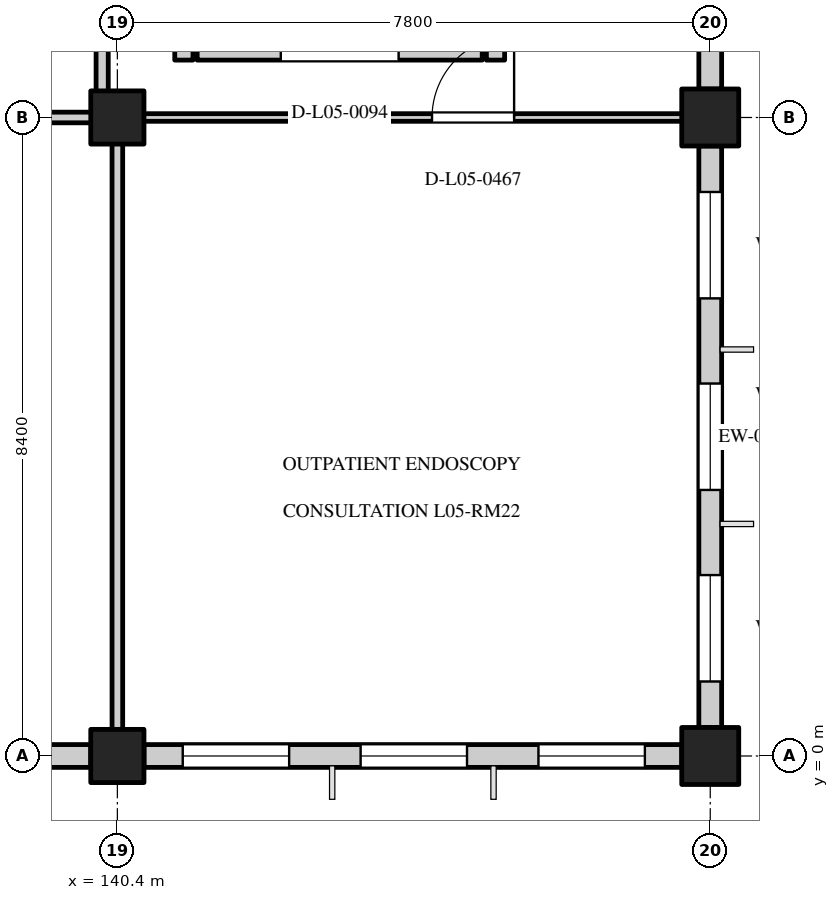
"""IFC4 building model, lengths in metres.
Left out: names, types, materials, properties, quantities, classifications, styles, units other than length and angle.
Written with IfcOpenShell. Run it as: python <this file> out.ifc"""

import sys

from ifc_helpers import new_model, si_unit, direction, frame, frame_2d, origin, origin_2d, place, context, subcontext, project, spatial, rectangle, extrude, element, fill, save


model = new_model("IFC4")
c1 = context("Model", 3, precision=1e-05, world=origin(), true_north=direction((0.0, 1.0)))
c2 = subcontext(c1, "Body", "Model", "MODEL_VIEW")
j1 = project(units=[si_unit("LENGTHUNIT", "METRE"), si_unit("PLANEANGLEUNIT", "RADIAN")], contexts=[c1])
p1 = place(None, origin())
s1 = spatial("IfcSite", under=j1, at=p1, CompositionType="ELEMENT")
p2 = place(p1, origin())
s2 = spatial("IfcBuilding", under=s1, at=p2, CompositionType="ELEMENT")
p3 = place(p2, frame((0.0, 0.0, 22.2)))
s3 = spatial("IfcBuildingStorey", under=s2, at=p3, CompositionType="ELEMENT", Elevation=22.2)
for number, where, z_axis, x_axis in (
    (1, (140.4, 0.0, 0.0), (0.0, 0.0, 1.0), (1.0, 0.0, 0.0)),
    (2, (140.4, 8.4, 0.0), (0.0, 0.0, 1.0), (1.0, 0.0, 0.0)),
):
    element("IfcColumn", number, at=place(p3, frame(where, z_axis=z_axis, x_axis=x_axis)), inside=s3, PredefinedType="COLUMN", context=c2, shape_type="SweptSolid", body=[
        extrude(rectangle(XDim=0.7, YDim=0.7, at=origin_2d()), origin(), (0.0, 0.0, 1.0), 3.9),
    ])
for number, where, z_axis, x_axis in (
    (3, (148.2, 0.0, 0.0), (0.0, 0.0, 1.0), (1.0, 0.0, 0.0)),
    (4, (148.2, 8.4, 0.0), (0.0, 0.0, 1.0), (1.0, 0.0, 0.0)),
):
    element("IfcColumn", number, at=place(p3, frame(where, z_axis=z_axis, x_axis=x_axis)), inside=s3, PredefinedType="COLUMN", context=c2, shape_type="SweptSolid", body=[
        extrude(rectangle(XDim=0.75, YDim=0.75, at=origin_2d()), origin(), (0.0, 0.0, 1.0), 3.9),
    ])
p4 = place(p3, frame((132.95, 0.0, 0.0), z_axis=(0.0, 0.0, 1.0), x_axis=(1.0, 0.0, 0.0)))
e5 = element("IfcWall", 5, at=p4, inside=s3, PredefinedType="STANDARD", context=c2, shape_type="SweptSolid", body=[
    extrude(rectangle(XDim=7.1, YDim=0.3, at=frame_2d((3.55, 0.0))), origin(), (0.0, 0.0, 1.0), 3.05),
])
p5 = place(p4, frame((0.61, 0.0, 0.8)))
e6 = element("IfcOpeningElement", 6, at=p5, cuts=e5, PredefinedType="OPENING", context=c2, shape_type="SweptSolid", body=[
    extrude(rectangle(XDim=1.2, YDim=1.4, at=frame_2d((0.6, 0.7))), frame((0.0, 0.162, 0.0), z_axis=(0.0, -1.0, 0.0), x_axis=(1.0, 0.0, 0.0)), (0.0, 0.0, 1.0), 0.324),
])
p6 = place(p4, frame((2.95, 0.0, 0.8)))
e7 = element("IfcOpeningElement", 7, at=p6, cuts=e5, PredefinedType="OPENING", context=c2, shape_type="SweptSolid", body=[
    extrude(rectangle(XDim=1.2, YDim=1.4, at=frame_2d((0.6, 0.7))), frame((0.0, 0.162, 0.0), z_axis=(0.0, -1.0, 0.0), x_axis=(1.0, 0.0, 0.0)), (0.0, 0.0, 1.0), 0.324),
])
p7 = place(p4, frame((5.29, 0.0, 0.8)))
e8 = element("IfcOpeningElement", 8, at=p7, cuts=e5, PredefinedType="OPENING", context=c2, shape_type="SweptSolid", body=[
    extrude(rectangle(XDim=1.2, YDim=1.4, at=frame_2d((0.6, 0.7))), frame((0.0, 0.162, 0.0), z_axis=(0.0, -1.0, 0.0), x_axis=(1.0, 0.0, 0.0)), (0.0, 0.0, 1.0), 0.324),
])
p8 = place(p3, frame((140.75, 0.0, 0.0), z_axis=(0.0, 0.0, 1.0), x_axis=(1.0, 0.0, 0.0)))
e9 = element("IfcWall", 9, at=p8, inside=s3, PredefinedType="STANDARD", context=c2, shape_type="SweptSolid", body=[
    extrude(rectangle(XDim=7.075, YDim=0.3, at=frame_2d((3.538, 0.0))), origin(), (0.0, 0.0, 1.0), 3.05),
])
p9 = place(p8, frame((0.51, 0.0, 0.8)))
e10 = element("IfcOpeningElement", 10, at=p9, cuts=e9, PredefinedType="OPENING", context=c2, shape_type="SweptSolid", body=[
    extrude(rectangle(XDim=1.4, YDim=1.6, at=frame_2d((0.7, 0.8))), frame((0.0, 0.162, 0.0), z_axis=(0.0, -1.0, 0.0), x_axis=(1.0, 0.0, 0.0)), (0.0, 0.0, 1.0), 0.324),
])
p10 = place(p8, frame((2.85, 0.0, 0.8)))
e11 = element("IfcOpeningElement", 11, at=p10, cuts=e9, PredefinedType="OPENING", context=c2, shape_type="SweptSolid", body=[
    extrude(rectangle(XDim=1.4, YDim=1.6, at=frame_2d((0.7, 0.8))), frame((0.0, 0.162, 0.0), z_axis=(0.0, -1.0, 0.0), x_axis=(1.0, 0.0, 0.0)), (0.0, 0.0, 1.0), 0.324),
])
p11 = place(p8, frame((5.19, 0.0, 0.8)))
e12 = element("IfcOpeningElement", 12, at=p11, cuts=e9, PredefinedType="OPENING", context=c2, shape_type="SweptSolid", body=[
    extrude(rectangle(XDim=1.4, YDim=1.6, at=frame_2d((0.7, 0.8))), frame((0.0, 0.162, 0.0), z_axis=(0.0, -1.0, 0.0), x_axis=(1.0, 0.0, 0.0)), (0.0, 0.0, 1.0), 0.324),
])
p12 = place(p3, frame((148.2, 0.375, 0.0), z_axis=(0.0, 0.0, 1.0), x_axis=(0.0, 1.0, 0.0)))
e13 = element("IfcWall", 13, at=p12, inside=s3, PredefinedType="STANDARD", context=c2, shape_type="SweptSolid", body=[
    extrude(rectangle(XDim=7.65, YDim=0.3, at=frame_2d((3.825, 0.0))), origin(), (0.0, 0.0, 1.0), 2.95),
])
p13 = place(p12, frame((0.605, 0.0, 0.8)))
e14 = element("IfcOpeningElement", 14, at=p13, cuts=e13, PredefinedType="OPENING", context=c2, shape_type="SweptSolid", body=[
    extrude(rectangle(XDim=1.4, YDim=1.45, at=frame_2d((0.7, 0.725))), frame((0.0, 0.162, 0.0), z_axis=(0.0, -1.0, 0.0), x_axis=(1.0, 0.0, 0.0)), (0.0, 0.0, 1.0), 0.324),
])
p14 = place(p12, frame((3.125, 0.0, 0.8)))
e15 = element("IfcOpeningElement", 15, at=p14, cuts=e13, PredefinedType="OPENING", context=c2, shape_type="SweptSolid", body=[
    extrude(rectangle(XDim=1.4, YDim=1.45, at=frame_2d((0.7, 0.725))), frame((0.0, 0.162, 0.0), z_axis=(0.0, -1.0, 0.0), x_axis=(1.0, 0.0, 0.0)), (0.0, 0.0, 1.0), 0.324),
])
p15 = place(p12, frame((5.645, 0.0, 0.8)))
e16 = element("IfcOpeningElement", 16, at=p15, cuts=e13, PredefinedType="OPENING", context=c2, shape_type="SweptSolid", body=[
    extrude(rectangle(XDim=1.4, YDim=1.45, at=frame_2d((0.7, 0.725))), frame((0.0, 0.162, 0.0), z_axis=(0.0, -1.0, 0.0), x_axis=(1.0, 0.0, 0.0)), (0.0, 0.0, 1.0), 0.324),
])
p16 = place(p3, frame((148.2, 8.775, 0.0), z_axis=(0.0, 0.0, 1.0), x_axis=(0.0, 1.0, 0.0)))
e17 = element("IfcWall", 17, at=p16, inside=s3, PredefinedType="STANDARD", context=c2, shape_type="SweptSolid", body=[
    extrude(rectangle(XDim=7.65, YDim=0.3, at=frame_2d((3.825, 0.0))), origin(), (0.0, 0.0, 1.0), 2.95),
])
p17 = place(p16, frame((0.705, 0.0, 0.8)))
e18 = element("IfcOpeningElement", 18, at=p17, cuts=e17, PredefinedType="OPENING", context=c2, shape_type="SweptSolid", body=[
    extrude(rectangle(XDim=1.2, YDim=1.55, at=frame_2d((0.6, 0.775))), frame((0.0, 0.162, 0.0), z_axis=(0.0, -1.0, 0.0), x_axis=(1.0, 0.0, 0.0)), (0.0, 0.0, 1.0), 0.324),
])
p18 = place(p16, frame((3.225, 0.0, 0.8)))
e19 = element("IfcOpeningElement", 19, at=p18, cuts=e17, PredefinedType="OPENING", context=c2, shape_type="SweptSolid", body=[
    extrude(rectangle(XDim=1.2, YDim=1.55, at=frame_2d((0.6, 0.775))), frame((0.0, 0.162, 0.0), z_axis=(0.0, -1.0, 0.0), x_axis=(1.0, 0.0, 0.0)), (0.0, 0.0, 1.0), 0.324),
])
p19 = place(p16, frame((5.745, 0.0, 0.8)))
e20 = element("IfcOpeningElement", 20, at=p19, cuts=e17, PredefinedType="OPENING", context=c2, shape_type="SweptSolid", body=[
    extrude(rectangle(XDim=1.2, YDim=1.55, at=frame_2d((0.6, 0.775))), frame((0.0, 0.162, 0.0), z_axis=(0.0, -1.0, 0.0), x_axis=(1.0, 0.0, 0.0)), (0.0, 0.0, 1.0), 0.324),
])
for number, where, z_axis, x_axis in (
    (21, (141.275, 9.155, 0.0), (0.0, 0.0, 1.0), (0.0, 1.0, 0.0)),
    (22, (145.375, 9.155, 0.0), (0.0, 0.0, 1.0), (0.0, 1.0, 0.0)),
):
    element("IfcWall", number, at=place(p3, frame(where, z_axis=z_axis, x_axis=x_axis)), inside=s3, PredefinedType="STANDARD", context=c2, shape_type="SweptSolid", body=[
        extrude(rectangle(XDim=2.695, YDim=0.24, at=frame_2d((1.348, 0.0))), origin(), (0.0, 0.0, 1.0), 3.6),
    ])
p20 = place(p3, frame((141.45, 9.275, 0.0), z_axis=(0.0, 0.0, 1.0), x_axis=(1.0, 0.0, 0.0)))
e23 = element("IfcWall", 23, at=p20, inside=s3, PredefinedType="STANDARD", context=c2, shape_type="SweptSolid", body=[
    extrude(rectangle(XDim=3.75, YDim=0.24, at=frame_2d((1.875, 0.0))), origin(), (0.0, 0.0, 1.0), 3.6),
])
p21 = place(p20, frame((1.1, 0.0, 0.0)))
e24 = element("IfcOpeningElement", 24, at=p21, cuts=e23, PredefinedType="OPENING", context=c2, shape_type="SweptSolid", body=[
    extrude(rectangle(XDim=1.55, YDim=2.25, at=frame_2d((0.775, 1.125))), frame((0.0, 0.132, 0.0), z_axis=(0.0, -1.0, 0.0), x_axis=(1.0, 0.0, 0.0)), (0.0, 0.0, 1.0), 0.264),
])
p22 = place(p3, frame((132.29, 8.4, 0.0), z_axis=(0.0, 0.0, 1.0), x_axis=(1.0, 0.0, 0.0)))
e25 = element("IfcWall", 25, at=p22, inside=s3, PredefinedType="PARTITIONING", context=c2, shape_type="SweptSolid", body=[
    extrude(rectangle(XDim=8.025, YDim=0.14, at=frame_2d((4.012, 0.0))), origin(), (0.0, 0.0, 1.0), 3.58),
])
p23 = place(p22, frame((2.341, 0.0, 0.0)))
e26 = element("IfcOpeningElement", 26, at=p23, cuts=e25, PredefinedType="OPENING", context=c2, shape_type="SweptSolid", body=[
    extrude(rectangle(XDim=1.95, YDim=2.35, at=frame_2d((0.975, 1.175))), frame((0.0, 0.082, 0.0), z_axis=(0.0, -1.0, 0.0), x_axis=(1.0, 0.0, 0.0)), (0.0, 0.0, 1.0), 0.164),
])
p24 = place(p3, frame((140.4, 0.085, 0.0), z_axis=(0.0, 0.0, 1.0), x_axis=(0.0, 1.0, 0.0)))
e27 = element("IfcWall", 27, at=p24, inside=s3, PredefinedType="PARTITIONING", context=c2, shape_type="SweptSolid", body=[
    extrude(rectangle(XDim=8.23, YDim=0.14, at=frame_2d((4.115, 0.0))), origin(), (0.0, 0.0, 1.0), 3.58),
])
p25 = place(p3, frame((140.2, 8.485, 0.0), z_axis=(0.0, 0.0, 1.0), x_axis=(0.0, 1.0, 0.0)))
e28 = element("IfcWall", 28, at=p25, inside=s3, PredefinedType="PARTITIONING", context=c2, shape_type="SweptSolid", body=[
    extrude(rectangle(XDim=16.63, YDim=0.16, at=frame_2d((8.315, 0.0))), origin(), (0.0, 0.0, 1.0), 3.58),
])
p26 = place(p3, frame((140.485, 8.4, 0.0), z_axis=(0.0, 0.0, 1.0), x_axis=(1.0, 0.0, 0.0)))
e29 = element("IfcWall", 29, at=p26, inside=s3, PredefinedType="PARTITIONING", context=c2, shape_type="SweptSolid", body=[
    extrude(rectangle(XDim=7.43, YDim=0.1, at=frame_2d((3.715, 0.0))), origin(), (0.0, 0.0, 1.0), 3.58),
])
p27 = place(p26, frame((4.055, 0.0, 0.0)))
e30 = element("IfcOpeningElement", 30, at=p27, cuts=e29, PredefinedType="OPENING", context=c2, shape_type="SweptSolid", body=[
    extrude(rectangle(XDim=1.08, YDim=2.15, at=frame_2d((0.54, 1.075))), frame((0.0, 0.062, 0.0), z_axis=(0.0, -1.0, 0.0), x_axis=(1.0, 0.0, 0.0)), (0.0, 0.0, 1.0), 0.124),
])
p28 = place(p9, origin())
e31 = element("IfcWindow", 31, at=p28, inside=s3, PartitioningType="SINGLE_PANEL", PredefinedType="WINDOW", context=c2, shape_type="SweptSolid", body=[
    extrude(rectangle(XDim=1.4, YDim=1.6, at=frame_2d((0.7, 0.8))), frame((0.0, 0.03, 0.0), z_axis=(0.0, -1.0, 0.0), x_axis=(1.0, 0.0, 0.0)), (0.0, 0.0, 1.0), 0.06),
])
fill(e10, e31)
p29 = place(p10, origin())
e32 = element("IfcWindow", 32, at=p29, inside=s3, PartitioningType="SINGLE_PANEL", PredefinedType="WINDOW", context=c2, shape_type="SweptSolid", body=[
    extrude(rectangle(XDim=1.4, YDim=1.6, at=frame_2d((0.7, 0.8))), frame((0.0, 0.03, 0.0), z_axis=(0.0, -1.0, 0.0), x_axis=(1.0, 0.0, 0.0)), (0.0, 0.0, 1.0), 0.06),
])
fill(e11, e32)
p30 = place(p11, origin())
e33 = element("IfcWindow", 33, at=p30, inside=s3, PartitioningType="SINGLE_PANEL", PredefinedType="WINDOW", context=c2, shape_type="SweptSolid", body=[
    extrude(rectangle(XDim=1.4, YDim=1.6, at=frame_2d((0.7, 0.8))), frame((0.0, 0.03, 0.0), z_axis=(0.0, -1.0, 0.0), x_axis=(1.0, 0.0, 0.0)), (0.0, 0.0, 1.0), 0.06),
])
fill(e12, e33)
p31 = place(p13, origin())
e34 = element("IfcWindow", 34, at=p31, inside=s3, PartitioningType="SINGLE_PANEL", PredefinedType="WINDOW", context=c2, shape_type="SweptSolid", body=[
    extrude(rectangle(XDim=1.4, YDim=1.45, at=frame_2d((0.7, 0.725))), frame((0.0, 0.03, 0.0), z_axis=(0.0, -1.0, 0.0), x_axis=(1.0, 0.0, 0.0)), (0.0, 0.0, 1.0), 0.06),
])
fill(e14, e34)
p32 = place(p14, origin())
e35 = element("IfcWindow", 35, at=p32, inside=s3, PartitioningType="SINGLE_PANEL", PredefinedType="WINDOW", context=c2, shape_type="SweptSolid", body=[
    extrude(rectangle(XDim=1.4, YDim=1.45, at=frame_2d((0.7, 0.725))), frame((0.0, 0.03, 0.0), z_axis=(0.0, -1.0, 0.0), x_axis=(1.0, 0.0, 0.0)), (0.0, 0.0, 1.0), 0.06),
])
fill(e15, e35)
p33 = place(p15, origin())
e36 = element("IfcWindow", 36, at=p33, inside=s3, PartitioningType="SINGLE_PANEL", PredefinedType="WINDOW", context=c2, shape_type="SweptSolid", body=[
    extrude(rectangle(XDim=1.4, YDim=1.45, at=frame_2d((0.7, 0.725))), frame((0.0, 0.03, 0.0), z_axis=(0.0, -1.0, 0.0), x_axis=(1.0, 0.0, 0.0)), (0.0, 0.0, 1.0), 0.06),
])
fill(e16, e36)
p34 = place(p21, origin())
e37 = element("IfcDoor", 37, at=p34, inside=s3, OperationType="DOUBLE_DOOR_SINGLE_SWING", PredefinedType="DOOR", context=c2, shape_type="SweptSolid", body=[
    extrude(rectangle(XDim=1.55, YDim=2.25, at=frame_2d((0.775, 1.125))), frame((0.0, 0.025, 0.0), z_axis=(0.0, -1.0, 0.0), x_axis=(1.0, 0.0, 0.0)), (0.0, 0.0, 1.0), 0.05),
])
fill(e24, e37)
p35 = place(p27, frame((1.08, 0.0, 0.0), z_axis=(0.0, 0.0, 1.0), x_axis=(-1.0, 0.0, 0.0)))
e38 = element("IfcDoor", 38, at=p35, inside=s3, OperationType="SINGLE_SWING_LEFT", PredefinedType="DOOR", context=c2, shape_type="SweptSolid", body=[
    extrude(rectangle(XDim=1.08, YDim=2.15, at=frame_2d((0.54, 1.075))), frame((0.0, 0.025, 0.0), z_axis=(0.0, -1.0, 0.0), x_axis=(1.0, 0.0, 0.0)), (0.0, 0.0, 1.0), 0.05),
])
fill(e30, e38)
save(model, sys.argv[1])
